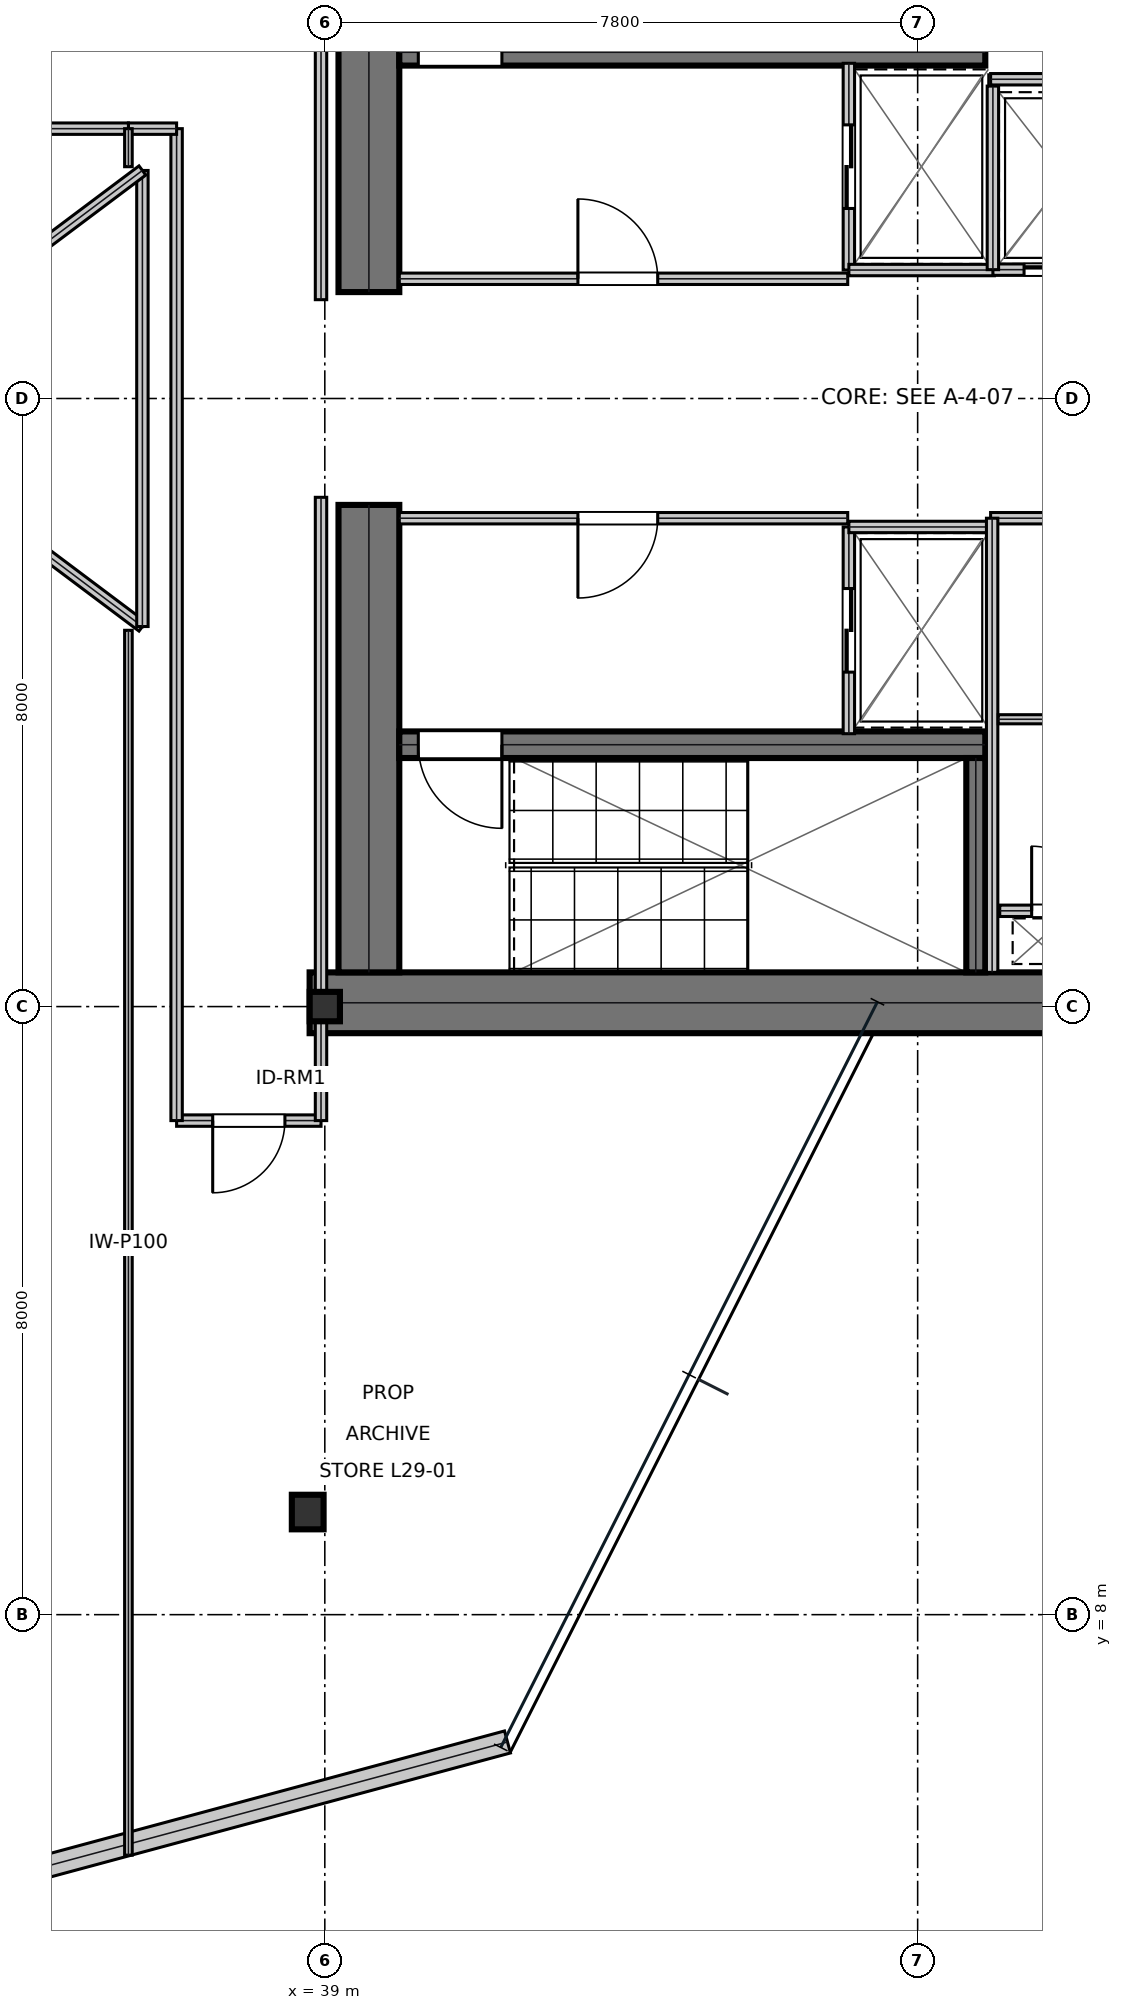
"""IFC4 building model, lengths in metres.
Left out: names, types, materials, properties, quantities, classifications, styles, units other than length and angle.
Written with IfcOpenShell. Run it as: python <this file> out.ifc"""

import sys

from ifc_helpers import new_model, si_unit, direction, frame, frame_2d, origin, origin_2d, place, context, subcontext, project, spatial, rectangle, i_section, extrude, element, fill, save


model = new_model("IFC4")
c1 = context("Model", 3, precision=1e-05, world=origin(), true_north=direction((0.0, 1.0)))
c2 = subcontext(c1, "Body", "Model", "MODEL_VIEW")
j1 = project(units=[si_unit("LENGTHUNIT", "METRE"), si_unit("PLANEANGLEUNIT", "RADIAN")], contexts=[c1])
p1 = place(None, origin())
s1 = spatial("IfcSite", under=j1, at=p1, CompositionType="ELEMENT")
p2 = place(p1, origin())
s2 = spatial("IfcBuilding", under=s1, at=p2, CompositionType="ELEMENT")
p3 = place(p2, frame((0.0, 0.0, 129.0)))
s3 = spatial("IfcBuildingStorey", under=s2, at=p3, CompositionType="ELEMENT", Elevation=129.0)
p4 = place(p3, frame((38.8, 16.05, 0.0), z_axis=(0.0, 0.0, 1.0), x_axis=(1.0, 0.0, 0.0)))
e1 = element("IfcWall", 1, at=p4, inside=s3, PredefinedType="SHEAR", context=c2, shape_type="SweptSolid", body=[
    extrude(rectangle(XDim=16.0, YDim=0.8, at=frame_2d((8.0, 0.0))), origin(), (0.0, 0.0, 1.0), 3.81),
])
for number, where, z_axis, x_axis in (
    (2, (39.58, 16.45, 0.0), (0.0, 0.0, 1.0), (0.0, 1.0, 0.0)),
    (3, (39.58, 25.4, 0.0), (0.0, 0.0, 1.0), (0.0, 1.0, 0.0)),
):
    element("IfcWall", number, at=place(p3, frame(where, z_axis=z_axis, x_axis=x_axis)), inside=s3, PredefinedType="SHEAR", context=c2, shape_type="SweptSolid", body=[
        extrude(rectangle(XDim=6.15, YDim=0.8, at=frame_2d((3.075, 0.0))), origin(), (0.0, 0.0, 1.0), 3.81),
    ])
p5 = place(p3, frame((39.98, 28.555, 0.0), z_axis=(0.0, 0.0, 1.0), x_axis=(1.0, 0.0, 0.0)))
e4 = element("IfcWall", 4, at=p5, inside=s3, PredefinedType="SHEAR", context=c2, shape_type="SweptSolid", body=[
    extrude(rectangle(XDim=7.71, YDim=0.35, at=frame_2d((3.855, 0.0))), origin(), (0.0, 0.0, 1.0), 3.81),
])
p6 = place(p5, frame((0.25, 0.0, 0.0)))
e5 = element("IfcOpeningElement", 5, at=p6, cuts=e4, PredefinedType="OPENING", context=c2, shape_type="SweptSolid", body=[
    extrude(rectangle(XDim=1.1, YDim=2.15, at=frame_2d((0.55, 1.075))), frame((0.0, 0.185, 0.0), z_axis=(0.0, -1.0, 0.0), x_axis=(1.0, 0.0, 0.0)), (0.0, 0.0, 1.0), 0.37),
])
p7 = place(p3, frame((39.98, 19.445, 0.0), z_axis=(0.0, 0.0, 1.0), x_axis=(1.0, 0.0, 0.0)))
e6 = element("IfcWall", 6, at=p7, inside=s3, PredefinedType="SHEAR", context=c2, shape_type="SweptSolid", body=[
    extrude(rectangle(XDim=7.71, YDim=0.35, at=frame_2d((3.855, 0.0))), origin(), (0.0, 0.0, 1.0), 3.81),
])
p8 = place(p7, frame((0.25, 0.0, 0.0)))
e7 = element("IfcOpeningElement", 7, at=p8, cuts=e6, PredefinedType="OPENING", context=c2, shape_type="SweptSolid", body=[
    extrude(rectangle(XDim=1.1, YDim=2.15, at=frame_2d((0.55, 1.075))), frame((0.0, 0.185, 0.0), z_axis=(0.0, -1.0, 0.0), x_axis=(1.0, 0.0, 0.0)), (0.0, 0.0, 1.0), 0.37),
])
p9 = place(p3, frame((47.565, 16.45, 0.0), z_axis=(0.0, 0.0, 1.0), x_axis=(0.0, 1.0, 0.0)))
e8 = element("IfcWall", 8, at=p9, inside=s3, PredefinedType="SHEAR", context=c2, shape_type="SweptSolid", body=[
    extrude(rectangle(XDim=2.82, YDim=0.25, at=frame_2d((1.41, 0.0))), origin(), (0.0, 0.0, 1.0), 3.81),
])
p10 = place(p3, frame((39.0, 16.0, 0.0), z_axis=(0.0, 0.0, 1.0), x_axis=(1.0, 0.0, 0.0)))
e9 = element("IfcColumn", 9, at=p10, inside=s3, PredefinedType="COLUMN", context=c2, shape_type="SweptSolid", body=[
    extrude(i_section(OverallWidth=0.398, OverallDepth=0.387, WebThickness=0.021, FlangeThickness=0.033, at=origin_2d()), origin(), (0.0, 0.0, 1.0), 4.044),
])
p11 = place(p3, frame((38.775, 9.35, 0.016), z_axis=(0.0, 0.0, 1.0), x_axis=(1.0, 0.0, 0.0)))
e10 = element("IfcColumn", 10, at=p11, inside=s3, PredefinedType="COLUMN", context=c2, shape_type="SweptSolid", body=[
    extrude(i_section(OverallWidth=0.418, OverallDepth=0.455, WebThickness=0.042, FlangeThickness=0.068, at=origin_2d()), origin(), (0.0, 0.0, 1.0), 4.018),
])
p12 = place(p3, frame((35.079, 4.62, 0.0), z_axis=(0.0, 0.0, 1.0), x_axis=(0.965531145086, 0.260287548434, 0.0)))
e11 = element("IfcWall", 11, at=p12, inside=s3, PredefinedType="STANDARD", context=c2, shape_type="SweptSolid", body=[
    extrude(rectangle(XDim=6.551, YDim=0.3, at=frame_2d((3.275, 0.0))), origin(), (0.0, 0.0, 1.0), 3.81),
])
p13 = place(p3, frame((39.98, 25.575, 0.0), z_axis=(0.0, 0.0, 1.0), x_axis=(1.0, 0.0, 0.0)))
e12 = element("IfcWall", 12, at=p13, inside=s3, PredefinedType="PARTITIONING", context=c2, shape_type="SweptSolid", body=[
    extrude(rectangle(XDim=5.9, YDim=0.15, at=frame_2d((2.95, 0.0))), origin(), (0.0, 0.0, 1.0), 3.81),
])
p14 = place(p13, frame((2.35, 0.0, 0.0)))
e13 = element("IfcOpeningElement", 13, at=p14, cuts=e12, PredefinedType="OPENING", context=c2, shape_type="SweptSolid", body=[
    extrude(rectangle(XDim=1.05, YDim=2.15, at=frame_2d((0.525, 1.075))), frame((0.0, 0.085, 0.0), z_axis=(0.0, -1.0, 0.0), x_axis=(1.0, 0.0, 0.0)), (0.0, 0.0, 1.0), 0.17),
])
p15 = place(p3, frame((39.98, 22.425, 0.0), z_axis=(0.0, 0.0, 1.0), x_axis=(1.0, 0.0, 0.0)))
e14 = element("IfcWall", 14, at=p15, inside=s3, PredefinedType="PARTITIONING", context=c2, shape_type="SweptSolid", body=[
    extrude(rectangle(XDim=5.9, YDim=0.15, at=frame_2d((2.95, 0.0))), origin(), (0.0, 0.0, 1.0), 3.81),
])
p16 = place(p15, frame((2.35, 0.0, 0.0)))
e15 = element("IfcOpeningElement", 15, at=p16, cuts=e14, PredefinedType="OPENING", context=c2, shape_type="SweptSolid", body=[
    extrude(rectangle(XDim=1.05, YDim=2.15, at=frame_2d((0.525, 1.075))), frame((0.0, 0.085, 0.0), z_axis=(0.0, -1.0, 0.0), x_axis=(1.0, 0.0, 0.0)), (0.0, 0.0, 1.0), 0.17),
])
p17 = place(p3, frame((45.895, 25.69, 0.0), z_axis=(0.0, 0.0, 1.0), x_axis=(0.0, 1.0, 0.0)))
e16 = element("IfcWall", 16, at=p17, inside=s3, PredefinedType="PARTITIONING", context=c2, shape_type="SweptSolid", body=[
    extrude(rectangle(XDim=2.72, YDim=0.15, at=frame_2d((1.36, 0.0))), origin(), (0.0, 0.0, 1.0), 3.81),
])
p18 = place(p17, frame((0.81, 0.0, 0.0)))
e17 = element("IfcOpeningElement", 17, at=p18, cuts=e16, PredefinedType="OPENING", context=c2, shape_type="SweptSolid", body=[
    extrude(rectangle(XDim=1.1, YDim=2.15, at=frame_2d((0.55, 1.075))), frame((0.0, 0.085, 0.0), z_axis=(0.0, -1.0, 0.0), x_axis=(1.0, 0.0, 0.0)), (0.0, 0.0, 1.0), 0.17),
])
p19 = place(p3, frame((45.895, 25.69, 0.0), z_axis=(0.0, 0.0, 1.0), x_axis=(1.0, 0.0, 0.0)))
e18 = element("IfcWall", 18, at=p19, inside=s3, PredefinedType="PARTITIONING", context=c2, shape_type="SweptSolid", body=[
    extrude(rectangle(XDim=1.915, YDim=0.15, at=frame_2d((0.958, 0.0))), origin(), (0.0, 0.0, 1.0), 3.81),
])
p20 = place(p3, frame((45.895, 19.59, 0.0), z_axis=(0.0, 0.0, 1.0), x_axis=(0.0, 1.0, 0.0)))
e19 = element("IfcWall", 19, at=p20, inside=s3, PredefinedType="PARTITIONING", context=c2, shape_type="SweptSolid", body=[
    extrude(rectangle(XDim=2.72, YDim=0.15, at=frame_2d((1.36, 0.0))), origin(), (0.0, 0.0, 1.0), 3.81),
])
p21 = place(p20, frame((0.81, 0.0, 0.0)))
e20 = element("IfcOpeningElement", 20, at=p21, cuts=e19, PredefinedType="OPENING", context=c2, shape_type="SweptSolid", body=[
    extrude(rectangle(XDim=1.1, YDim=2.15, at=frame_2d((0.55, 1.075))), frame((0.0, 0.085, 0.0), z_axis=(0.0, -1.0, 0.0), x_axis=(1.0, 0.0, 0.0)), (0.0, 0.0, 1.0), 0.17),
])
p22 = place(p3, frame((45.895, 22.31, 0.0), z_axis=(0.0, 0.0, 1.0), x_axis=(1.0, 0.0, 0.0)))
e21 = element("IfcWall", 21, at=p22, inside=s3, PredefinedType="PARTITIONING", context=c2, shape_type="SweptSolid", body=[
    extrude(rectangle(XDim=1.915, YDim=0.15, at=frame_2d((0.958, 0.0))), origin(), (0.0, 0.0, 1.0), 3.81),
])
p23 = place(p3, frame((47.79, 25.695, 0.0), z_axis=(0.0, 0.0, 1.0), x_axis=(1.0, 0.0, 0.0)))
e22 = element("IfcWall", 22, at=p23, inside=s3, PredefinedType="PARTITIONING", context=c2, shape_type="SweptSolid", body=[
    extrude(rectangle(XDim=1.92, YDim=0.15, at=frame_2d((0.96, 0.0))), origin(), (0.0, 0.0, 1.0), 3.81),
])
p24 = place(p23, frame((0.41, 0.0, 0.0)))
e23 = element("IfcOpeningElement", 23, at=p24, cuts=e22, PredefinedType="OPENING", context=c2, shape_type="SweptSolid", body=[
    extrude(rectangle(XDim=1.1, YDim=2.15, at=frame_2d((0.55, 1.075))), frame((0.0, 0.085, 0.0), z_axis=(0.0, -1.0, 0.0), x_axis=(1.0, 0.0, 0.0)), (0.0, 0.0, 1.0), 0.17),
])
p25 = place(p3, frame((47.79, 25.695, 0.0), z_axis=(0.0, 0.0, 1.0), x_axis=(0.0, 1.0, 0.0)))
e24 = element("IfcWall", 24, at=p25, inside=s3, PredefinedType="PARTITIONING", context=c2, shape_type="SweptSolid", body=[
    extrude(rectangle(XDim=2.415, YDim=0.15, at=frame_2d((1.208, 0.0))), origin(), (0.0, 0.0, 1.0), 3.81),
])
p26 = place(p3, frame((47.88, 17.26, 0.0), z_axis=(0.0, 0.0, 1.0), x_axis=(1.0, 0.0, 0.0)))
e25 = element("IfcWall", 25, at=p26, inside=s3, PredefinedType="PARTITIONING", context=c2, shape_type="SweptSolid", body=[
    extrude(rectangle(XDim=1.72, YDim=0.15, at=frame_2d((0.86, 0.0))), origin(), (0.0, 0.0, 1.0), 3.81),
])
p27 = place(p26, frame((0.42, 0.0, 0.0)))
e26 = element("IfcOpeningElement", 26, at=p27, cuts=e25, PredefinedType="OPENING", context=c2, shape_type="SweptSolid", body=[
    extrude(rectangle(XDim=0.85, YDim=2.15, at=frame_2d((0.425, 1.075))), frame((0.0, 0.085, 0.0), z_axis=(0.0, -1.0, 0.0), x_axis=(1.0, 0.0, 0.0)), (0.0, 0.0, 1.0), 0.17),
])
p28 = place(p3, frame((47.76, 22.425, 0.0), z_axis=(0.0, 0.0, 1.0), x_axis=(1.0, 0.0, 0.0)))
e27 = element("IfcWall", 27, at=p28, inside=s3, PredefinedType="PARTITIONING", context=c2, shape_type="SweptSolid", body=[
    extrude(rectangle(XDim=1.96, YDim=0.15, at=frame_2d((0.98, 0.0))), origin(), (0.0, 0.0, 1.0), 3.81),
])
p29 = place(p3, frame((47.78, 16.45, 0.0), z_axis=(0.0, 0.0, 1.0), x_axis=(0.0, 1.0, 0.0)))
e28 = element("IfcWall", 28, at=p29, inside=s3, PredefinedType="PARTITIONING", context=c2, shape_type="SweptSolid", body=[
    extrude(rectangle(XDim=5.975, YDim=0.15, at=frame_2d((2.988, 0.0))), origin(), (0.0, 0.0, 1.0), 3.81),
])
p30 = place(p3, frame((47.86, 19.78, 0.0), z_axis=(0.0, 0.0, 1.0), x_axis=(1.0, 0.0, 0.0)))
e29 = element("IfcWall", 29, at=p30, inside=s3, PredefinedType="PARTITIONING", context=c2, shape_type="SweptSolid", body=[
    extrude(rectangle(XDim=1.76, YDim=0.12, at=frame_2d((0.88, 0.0))), origin(), (0.0, 0.0, 1.0), 3.81),
])
p31 = place(p3, frame((47.76, 28.2, 0.0), z_axis=(0.0, 0.0, 1.0), x_axis=(1.0, 0.0, 0.0)))
e30 = element("IfcWall", 30, at=p31, inside=s3, PredefinedType="PARTITIONING", context=c2, shape_type="SweptSolid", body=[
    extrude(rectangle(XDim=1.99, YDim=0.15, at=frame_2d((0.995, 0.0))), origin(), (0.0, 0.0, 1.0), 3.81),
])
p32 = place(p3, frame((37.05, 14.5, 0.0), z_axis=(0.0, 0.0, 1.0), x_axis=(1.0, 0.0, 0.0)))
e31 = element("IfcWall", 31, at=p32, inside=s3, PredefinedType="PARTITIONING", context=c2, shape_type="SweptSolid", body=[
    extrude(rectangle(XDim=1.9, YDim=0.15, at=frame_2d((0.95, 0.0))), origin(), (0.0, 0.0, 1.0), 3.19),
])
p33 = place(p32, frame((0.475, 0.0, 0.0)))
e32 = element("IfcOpeningElement", 32, at=p33, cuts=e31, PredefinedType="OPENING", context=c2, shape_type="SweptSolid", body=[
    extrude(rectangle(XDim=0.95, YDim=2.15, at=frame_2d((0.475, 1.075))), frame((0.0, 0.085, 0.0), z_axis=(0.0, -1.0, 0.0), x_axis=(1.0, 0.0, 0.0)), (0.0, 0.0, 1.0), 0.17),
])
p34 = place(p3, frame((37.05, 14.5, 0.0), z_axis=(0.0, 0.0, 1.0), x_axis=(0.0, 1.0, 0.0)))
e33 = element("IfcWall", 33, at=p34, inside=s3, PredefinedType="PARTITIONING", context=c2, shape_type="SweptSolid", body=[
    extrude(rectangle(XDim=13.05, YDim=0.15, at=frame_2d((6.525, 0.0))), origin(), (0.0, 0.0, 1.0), 3.19),
])
p35 = place(p3, frame((38.95, 14.5, 0.0), z_axis=(0.0, 0.0, 1.0), x_axis=(0.0, 1.0, 0.0)))
e34 = element("IfcWall", 34, at=p35, inside=s3, PredefinedType="PARTITIONING", context=c2, shape_type="SweptSolid", body=[
    extrude(rectangle(XDim=8.2, YDim=0.15, at=frame_2d((4.1, 0.0))), origin(), (0.0, 0.0, 1.0), 3.19),
])
p36 = place(p3, frame((36.416, 27.55, 0.0), z_axis=(0.0, 0.0, 1.0), x_axis=(1.0, 0.0, 0.0)))
e35 = element("IfcWall", 35, at=p36, inside=s3, PredefinedType="PARTITIONING", context=c2, shape_type="SweptSolid", body=[
    extrude(rectangle(XDim=0.634, YDim=0.15, at=frame_2d((0.317, 0.0))), origin(), (0.0, 0.0, 1.0), 3.443),
])
p37 = place(p3, frame((29.4, 27.55, 0.0), z_axis=(0.0, 0.0, 1.0), x_axis=(1.0, 0.0, 0.0)))
e36 = element("IfcWall", 36, at=p37, inside=s3, PredefinedType="PARTITIONING", context=c2, shape_type="SweptSolid", body=[
    extrude(rectangle(XDim=7.016, YDim=0.15, at=frame_2d((3.508, 0.0))), origin(), (0.0, 0.0, 1.0), 3.19),
])
p38 = place(p3, frame((38.95, 25.3, 0.0), z_axis=(0.0, 0.0, 1.0), x_axis=(0.0, 1.0, 0.0)))
e37 = element("IfcWall", 37, at=p38, inside=s3, PredefinedType="PARTITIONING", context=c2, shape_type="SweptSolid", body=[
    extrude(rectangle(XDim=8.2, YDim=0.15, at=frame_2d((4.1, 0.0))), origin(), (0.0, 0.0, 1.0), 3.19),
])
p39 = place(p3, frame((36.416, 4.836, 0.0), z_axis=(0.0, 0.0, 1.0), x_axis=(0.0, 1.0, 0.0)))
e38 = element("IfcWall", 38, at=p39, inside=s3, PredefinedType="PARTITIONING", context=c2, shape_type="SweptSolid", body=[
    extrude(rectangle(XDim=16.115, YDim=0.1, at=frame_2d((8.057, 0.0))), origin(), (0.0, 0.0, 1.0), 3.19),
])
p40 = place(p3, frame((36.416, 27.05, 0.0), z_axis=(0.0, 0.0, 1.0), x_axis=(0.0, 1.0, 0.0)))
e39 = element("IfcWall", 39, at=p40, inside=s3, PredefinedType="PARTITIONING", context=c2, shape_type="SweptSolid", body=[
    extrude(rectangle(XDim=0.5, YDim=0.1, at=frame_2d((0.25, 0.0))), origin(), (0.0, 0.0, 1.0), 3.81),
])
p41 = place(p3, frame((32.6, 24.0, 0.0), z_axis=(0.0, 0.0, 1.0), x_axis=(0.8, -0.6, 0.0)))
e40 = element("IfcWall", 40, at=p41, inside=s3, PredefinedType="MOVABLE", context=c2, shape_type="SweptSolid", body=[
    extrude(rectangle(XDim=5.0, YDim=0.15, at=frame_2d((2.5, 0.0))), origin(), (0.0, 0.0, 1.0), 3.81),
])
p42 = place(p3, frame((36.6, 21.0, 0.0), z_axis=(0.0, 0.0, 1.0), x_axis=(0.0, 1.0, 0.0)))
e41 = element("IfcWall", 41, at=p42, inside=s3, PredefinedType="MOVABLE", context=c2, shape_type="SweptSolid", body=[
    extrude(rectangle(XDim=6.0, YDim=0.15, at=frame_2d((3.0, 0.0))), origin(), (0.0, 0.0, 1.0), 3.81),
])
p43 = place(p3, frame((36.6, 27.0, 0.0), z_axis=(0.0, 0.0, 1.0), x_axis=(-0.8, -0.6, 0.0)))
e42 = element("IfcWall", 42, at=p43, inside=s3, PredefinedType="MOVABLE", context=c2, shape_type="SweptSolid", body=[
    extrude(rectangle(XDim=5.0, YDim=0.15, at=frame_2d((2.5, 0.0))), origin(), (0.0, 0.0, 1.0), 3.81),
])
p44 = place(p14, origin())
e43 = element("IfcDoor", 43, at=p44, inside=s3, OperationType="SINGLE_SWING_LEFT", PredefinedType="DOOR", context=c2, shape_type="SweptSolid", body=[
    extrude(rectangle(XDim=1.05, YDim=2.15, at=frame_2d((0.525, 1.075))), frame((0.0, 0.025, 0.0), z_axis=(0.0, -1.0, 0.0), x_axis=(1.0, 0.0, 0.0)), (0.0, 0.0, 1.0), 0.05),
])
fill(e13, e43)
p45 = place(p16, frame((1.05, 0.0, 0.0), z_axis=(0.0, 0.0, 1.0), x_axis=(-1.0, 0.0, 0.0)))
e44 = element("IfcDoor", 44, at=p45, inside=s3, OperationType="SINGLE_SWING_RIGHT", PredefinedType="DOOR", context=c2, shape_type="SweptSolid", body=[
    extrude(rectangle(XDim=1.05, YDim=2.15, at=frame_2d((0.525, 1.075))), frame((0.0, 0.025, 0.0), z_axis=(0.0, -1.0, 0.0), x_axis=(1.0, 0.0, 0.0)), (0.0, 0.0, 1.0), 0.05),
])
fill(e15, e44)
p46 = place(p18, frame((1.1, 0.0, 0.0), z_axis=(0.0, 0.0, 1.0), x_axis=(-1.0, 0.0, 0.0)))
e45 = element("IfcDoor", 45, at=p46, inside=s3, OperationType="DOUBLE_DOOR_SLIDING", PredefinedType="DOOR", context=c2, shape_type="SweptSolid", body=[
    extrude(rectangle(XDim=1.1, YDim=2.15, at=frame_2d((0.55, 1.075))), frame((0.0, 0.025, 0.0), z_axis=(0.0, -1.0, 0.0), x_axis=(1.0, 0.0, 0.0)), (0.0, 0.0, 1.0), 0.05),
])
fill(e17, e45)
p47 = place(p21, frame((1.1, 0.0, 0.0), z_axis=(0.0, 0.0, 1.0), x_axis=(-1.0, 0.0, 0.0)))
e46 = element("IfcDoor", 46, at=p47, inside=s3, OperationType="DOUBLE_DOOR_SLIDING", PredefinedType="DOOR", context=c2, shape_type="SweptSolid", body=[
    extrude(rectangle(XDim=1.1, YDim=2.15, at=frame_2d((0.55, 1.075))), frame((0.0, 0.025, 0.0), z_axis=(0.0, -1.0, 0.0), x_axis=(1.0, 0.0, 0.0)), (0.0, 0.0, 1.0), 0.05),
])
fill(e20, e46)
p48 = place(p24, frame((1.1, 0.0, 0.0), z_axis=(0.0, 0.0, 1.0), x_axis=(-1.0, 0.0, 0.0)))
e47 = element("IfcDoor", 47, at=p48, inside=s3, OperationType="DOUBLE_DOOR_SLIDING", PredefinedType="DOOR", context=c2, shape_type="SweptSolid", body=[
    extrude(rectangle(XDim=1.1, YDim=2.15, at=frame_2d((0.55, 1.075))), frame((0.0, 0.025, 0.0), z_axis=(0.0, -1.0, 0.0), x_axis=(1.0, 0.0, 0.0)), (0.0, 0.0, 1.0), 0.05),
])
fill(e23, e47)
p49 = place(p27, origin())
e48 = element("IfcDoor", 48, at=p49, inside=s3, OperationType="SINGLE_SWING_LEFT", PredefinedType="TRAPDOOR", context=c2, shape_type="SweptSolid", body=[
    extrude(rectangle(XDim=0.85, YDim=2.15, at=frame_2d((0.425, 1.075))), frame((0.0, 0.025, 0.0), z_axis=(0.0, -1.0, 0.0), x_axis=(1.0, 0.0, 0.0)), (0.0, 0.0, 1.0), 0.05),
])
fill(e26, e48)
p50 = place(p33, frame((0.95, 0.0, 0.0), z_axis=(0.0, 0.0, 1.0), x_axis=(-1.0, 0.0, 0.0)))
e49 = element("IfcDoor", 49, at=p50, inside=s3, OperationType="SINGLE_SWING_RIGHT", PredefinedType="DOOR", context=c2, shape_type="SweptSolid", body=[
    extrude(rectangle(XDim=0.95, YDim=2.15, at=frame_2d((0.475, 1.075))), frame((0.0, 0.025, 0.0), z_axis=(0.0, -1.0, 0.0), x_axis=(1.0, 0.0, 0.0)), (0.0, 0.0, 1.0), 0.05),
])
fill(e32, e49)
p51 = place(p6, origin())
e50 = element("IfcDoor", 50, at=p51, inside=s3, OperationType="SINGLE_SWING_RIGHT", PredefinedType="DOOR", context=c2, shape_type="SweptSolid", body=[
    extrude(rectangle(XDim=1.1, YDim=2.15, at=frame_2d((0.55, 1.075))), frame((0.0, 0.025, 0.0), z_axis=(0.0, -1.0, 0.0), x_axis=(1.0, 0.0, 0.0)), (0.0, 0.0, 1.0), 0.05),
])
fill(e5, e50)
p52 = place(p8, frame((1.1, 0.0, 0.0), z_axis=(0.0, 0.0, 1.0), x_axis=(-1.0, 0.0, 0.0)))
e51 = element("IfcDoor", 51, at=p52, inside=s3, OperationType="SINGLE_SWING_LEFT", PredefinedType="DOOR", context=c2, shape_type="SweptSolid", body=[
    extrude(rectangle(XDim=1.1, YDim=2.15, at=frame_2d((0.55, 1.075))), frame((0.0, 0.025, 0.0), z_axis=(0.0, -1.0, 0.0), x_axis=(1.0, 0.0, 0.0)), (0.0, 0.0, 1.0), 0.05),
])
fill(e7, e51)
save(model, sys.argv[1])
